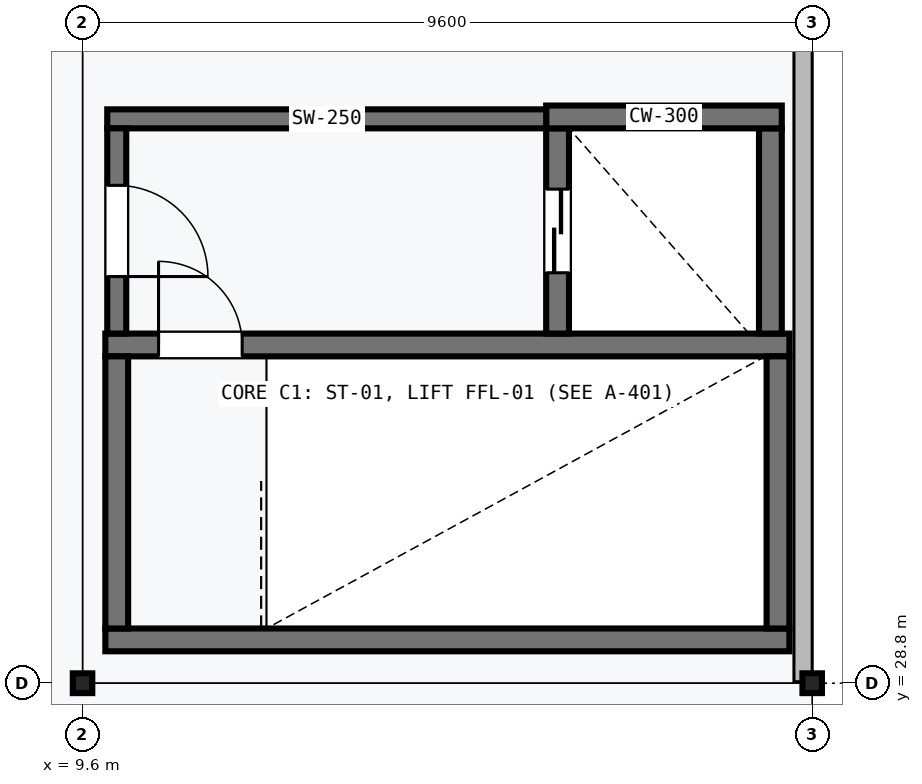
"""IFC4 building model, lengths in metres.
Left out: names, types, materials, properties, quantities, classifications, styles, units other than length and angle.
Written with IfcOpenShell. Run it as: python <this file> out.ifc"""

import sys

from ifc_helpers import new_model, si_unit, direction, frame, frame_2d, origin, origin_2d, place, context, subcontext, project, spatial, rectangle, i_section, extrude, element, fill, save


model = new_model("IFC4")
c1 = context("Model", 3, precision=1e-05, world=origin(), true_north=direction((0.0, 1.0)))
c2 = subcontext(c1, "Body", "Model", "MODEL_VIEW")
j1 = project(units=[si_unit("LENGTHUNIT", "METRE"), si_unit("PLANEANGLEUNIT", "RADIAN")], contexts=[c1])
p1 = place(None, origin())
s1 = spatial("IfcSite", under=j1, at=p1, CompositionType="ELEMENT")
p2 = place(p1, origin())
s2 = spatial("IfcBuilding", under=s1, at=p2, CompositionType="ELEMENT")
p3 = place(p2, frame((0.0, 0.0, 23.1)))
s3 = spatial("IfcBuildingStorey", under=s2, at=p3, CompositionType="ELEMENT", Elevation=23.1)
for number, where, z_axis, x_axis in (
    (1, (9.6, 28.8, 0.0), (0.0, 0.0, 1.0), (1.0, 0.0, 0.0)),
    (2, (19.2, 28.8, 0.0), (0.0, 0.0, 1.0), (1.0, 0.0, 0.0)),
):
    element("IfcColumn", number, at=place(p3, frame(where, z_axis=z_axis, x_axis=x_axis)), inside=s3, PredefinedType="COLUMN", context=c2, shape_type="SweptSolid", body=[
        extrude(i_section(OverallWidth=0.256, OverallDepth=0.26, WebThickness=0.01, FlangeThickness=0.017, FilletRadius=0.013, at=origin_2d()), origin(), (0.0, 0.0, 1.0), 3.92),
    ])
p4 = place(p3, frame((9.9, 29.37, 0.0), z_axis=(0.0, 0.0, 1.0), x_axis=(1.0, 0.0, 0.0)))
e3 = element("IfcWall", 3, at=p4, inside=s3, PredefinedType="SHEAR", context=c2, shape_type="SweptSolid", body=[
    extrude(rectangle(XDim=9.0, YDim=0.3, at=frame_2d((4.5, 0.0))), origin(), (0.0, 0.0, 1.0), 3.92),
])
p5 = place(p3, frame((18.9, 33.25, 0.0), z_axis=(0.0, 0.0, 1.0), x_axis=(-1.0, 0.0, 0.0)))
e4 = element("IfcWall", 4, at=p5, inside=s3, PredefinedType="SHEAR", context=c2, shape_type="SweptSolid", body=[
    extrude(rectangle(XDim=9.0, YDim=0.3, at=frame_2d((4.5, 0.0))), origin(), (0.0, 0.0, 1.0), 4.2),
])
p6 = place(p5, frame((7.2, 0.0, 0.0)))
e5 = element("IfcOpeningElement", 5, at=p6, cuts=e4, PredefinedType="OPENING", context=c2, shape_type="SweptSolid", body=[
    extrude(rectangle(XDim=1.1, YDim=2.15, at=frame_2d((0.55, 1.075))), frame((0.0, 0.16, 0.0), z_axis=(0.0, -1.0, 0.0), x_axis=(1.0, 0.0, 0.0)), (0.0, 0.0, 1.0), 0.32),
])
for number, where, z_axis, x_axis in (
    (6, (10.05, 29.52, 0.0), (0.0, 0.0, 1.0), (0.0, 1.0, 0.0)),
    (7, (18.75, 33.1, 0.0), (0.0, 0.0, 1.0), (0.0, -1.0, 0.0)),
):
    element("IfcWall", number, at=place(p3, frame(where, z_axis=z_axis, x_axis=x_axis)), inside=s3, PredefinedType="SHEAR", context=c2, shape_type="SweptSolid", body=[
        extrude(rectangle(XDim=3.58, YDim=0.3, at=frame_2d((1.79, 0.0))), origin(), (0.0, 0.0, 1.0), 3.92),
    ])
p7 = place(p3, frame((15.85, 36.1, 0.0), z_axis=(0.0, 0.0, 1.0), x_axis=(0.0, -1.0, 0.0)))
e8 = element("IfcWall", 8, at=p7, inside=s3, PredefinedType="SHEAR", context=c2, shape_type="SweptSolid", body=[
    extrude(rectangle(XDim=2.7, YDim=0.3, at=frame_2d((1.35, 0.0))), origin(), (0.0, 0.0, 1.0), 4.2),
])
p8 = place(p7, frame((0.8, 0.0, 0.0)))
e9 = element("IfcOpeningElement", 9, at=p8, cuts=e8, PredefinedType="OPENING", context=c2, shape_type="SweptSolid", body=[
    extrude(rectangle(XDim=1.1, YDim=2.1, at=frame_2d((0.55, 1.05))), frame((0.0, 0.16, 0.0), z_axis=(0.0, -1.0, 0.0), x_axis=(1.0, 0.0, 0.0)), (0.0, 0.0, 1.0), 0.32),
])
p9 = place(p3, frame((18.65, 33.4, 0.0), z_axis=(0.0, 0.0, 1.0), x_axis=(0.0, 1.0, 0.0)))
e10 = element("IfcWall", 10, at=p9, inside=s3, PredefinedType="SHEAR", context=c2, shape_type="SweptSolid", body=[
    extrude(rectangle(XDim=2.7, YDim=0.3, at=frame_2d((1.35, 0.0))), origin(), (0.0, 0.0, 1.0), 4.2),
])
p10 = place(p3, frame((15.7, 36.25, 0.0), z_axis=(0.0, 0.0, 1.0), x_axis=(1.0, 0.0, 0.0)))
e11 = element("IfcWall", 11, at=p10, inside=s3, PredefinedType="SHEAR", context=c2, shape_type="SweptSolid", body=[
    extrude(rectangle(XDim=3.1, YDim=0.3, at=frame_2d((1.55, 0.0))), origin(), (0.0, 0.0, 1.0), 4.2),
])
p11 = place(p3, frame((15.7, 36.225, 0.0), z_axis=(0.0, 0.0, 1.0), x_axis=(-1.0, 0.0, 0.0)))
e12 = element("IfcWall", 12, at=p11, inside=s3, PredefinedType="SHEAR", context=c2, shape_type="SweptSolid", body=[
    extrude(rectangle(XDim=5.775, YDim=0.25, at=frame_2d((2.887, 0.0))), origin(), (0.0, 0.0, 1.0), 3.92),
])
p12 = place(p3, frame((10.05, 33.4, 0.0), z_axis=(0.0, 0.0, 1.0), x_axis=(0.0, 1.0, 0.0)))
e13 = element("IfcWall", 13, at=p12, inside=s3, PredefinedType="SHEAR", context=c2, shape_type="SweptSolid", body=[
    extrude(rectangle(XDim=2.7, YDim=0.25, at=frame_2d((1.35, 0.0))), origin(), (0.0, 0.0, 1.0), 3.92),
])
p13 = place(p12, frame((0.75, 0.0, 0.0)))
e14 = element("IfcOpeningElement", 14, at=p13, cuts=e13, PredefinedType="OPENING", context=c2, shape_type="SweptSolid", body=[
    extrude(rectangle(XDim=1.2, YDim=2.15, at=frame_2d((0.6, 1.075))), frame((0.0, 0.135, 0.0), z_axis=(0.0, -1.0, 0.0), x_axis=(1.0, 0.0, 0.0)), (0.0, 0.0, 1.0), 0.27),
])
p14 = place(p3, frame((19.08, 38.38, 0.0), z_axis=(0.0, 0.0, 1.0), x_axis=(0.0, -1.0, 0.0)))
e15 = element("IfcWall", 15, at=p14, inside=s3, PredefinedType="SOLIDWALL", context=c2, shape_type="SweptSolid", body=[
    extrude(rectangle(XDim=9.56, YDim=0.24, at=frame_2d((4.78, 0.0))), origin(), (0.0, 0.0, 1.0), 3.463),
])
p15 = place(p6, frame((1.1, 0.0, 0.0), z_axis=(0.0, 0.0, 1.0), x_axis=(-1.0, 0.0, 0.0)))
e16 = element("IfcDoor", 16, at=p15, inside=s3, OperationType="SINGLE_SWING_RIGHT", PredefinedType="DOOR", context=c2, shape_type="SweptSolid", body=[
    extrude(rectangle(XDim=1.1, YDim=2.15, at=frame_2d((0.55, 1.075))), frame((0.0, 0.025, 0.0), z_axis=(0.0, -1.0, 0.0), x_axis=(1.0, 0.0, 0.0)), (0.0, 0.0, 1.0), 0.05),
])
fill(e5, e16)
p16 = place(p8, frame((1.1, 0.0, 0.0), z_axis=(0.0, 0.0, 1.0), x_axis=(-1.0, 0.0, 0.0)))
e17 = element("IfcDoor", 17, at=p16, inside=s3, OperationType="DOUBLE_DOOR_SLIDING", PredefinedType="DOOR", context=c2, shape_type="SweptSolid", body=[
    extrude(rectangle(XDim=1.1, YDim=2.1, at=frame_2d((0.55, 1.05))), frame((0.0, 0.025, 0.0), z_axis=(0.0, -1.0, 0.0), x_axis=(1.0, 0.0, 0.0)), (0.0, 0.0, 1.0), 0.05),
])
fill(e9, e17)
p17 = place(p13, frame((1.2, 0.0, 0.0), z_axis=(0.0, 0.0, 1.0), x_axis=(-1.0, 0.0, 0.0)))
e18 = element("IfcDoor", 18, at=p17, inside=s3, OperationType="SINGLE_SWING_LEFT", PredefinedType="DOOR", context=c2, shape_type="SweptSolid", body=[
    extrude(rectangle(XDim=1.2, YDim=2.15, at=frame_2d((0.6, 1.075))), frame((0.0, 0.025, 0.0), z_axis=(0.0, -1.0, 0.0), x_axis=(1.0, 0.0, 0.0)), (0.0, 0.0, 1.0), 0.05),
])
fill(e14, e18)
save(model, sys.argv[1])
